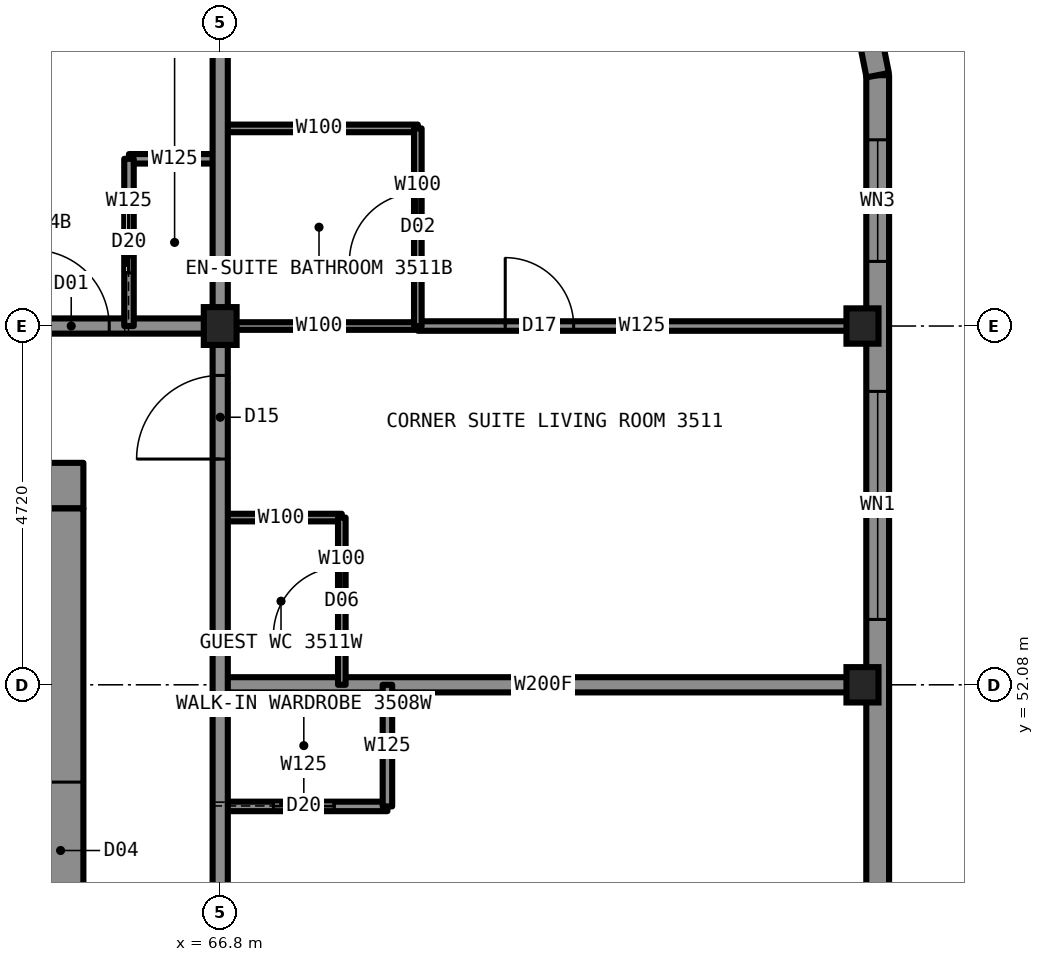
"""IFC4 building model, lengths in metres.
Left out: names, types, materials, properties, quantities, classifications, styles, units other than length and angle.
Written with IfcOpenShell. Run it as: python <this file> out.ifc"""

import sys

from ifc_helpers import new_model, si_unit, direction, frame, frame_2d, origin, origin_2d, place, context, subcontext, project, spatial, rectangle, i_section, extrude, element, fill, save


model = new_model("IFC4")
c1 = context("Model", 3, precision=1e-05, world=origin(), true_north=direction((0.0, 1.0)))
c2 = subcontext(c1, "Body", "Model", "MODEL_VIEW")
j1 = project(units=[si_unit("LENGTHUNIT", "METRE"), si_unit("PLANEANGLEUNIT", "RADIAN")], contexts=[c1])
p1 = place(None, origin())
s1 = spatial("IfcSite", under=j1, at=p1, CompositionType="ELEMENT")
p2 = place(p1, origin())
s2 = spatial("IfcBuilding", under=s1, at=p2, CompositionType="ELEMENT")
p3 = place(p2, frame((0.0, 0.0, 124.9)))
s3 = spatial("IfcBuildingStorey", under=s2, at=p3, CompositionType="ELEMENT", Elevation=124.9)
for number, where, z_axis, x_axis in (
    (1, (75.25, 52.08, 0.0), (0.0, 0.0, 1.0), (1.0, 0.0, 0.0)),
    (2, (75.25, 56.8, 0.0), (0.0, 0.0, 1.0), (1.0, 0.0, 0.0)),
):
    element("IfcColumn", number, at=place(p3, frame(where, z_axis=z_axis, x_axis=x_axis)), inside=s3, PredefinedType="COLUMN", context=c2, shape_type="SweptSolid", body=[
        extrude(i_section(OverallWidth=0.422, OverallDepth=0.465, WebThickness=0.045, FlangeThickness=0.073, at=origin_2d()), origin(), (0.0, 0.0, 1.0), 3.5),
    ])
p4 = place(p3, frame((66.8, 56.8, 0.0), z_axis=(0.0, 0.0, 1.0), x_axis=(1.0, 0.0, 0.0)))
e3 = element("IfcColumn", 3, at=p4, inside=s3, PredefinedType="COLUMN", context=c2, shape_type="SweptSolid", body=[
    extrude(i_section(OverallWidth=0.432, OverallDepth=0.498, WebThickness=0.056, FlangeThickness=0.089, at=origin_2d()), origin(), (0.0, 0.0, 1.0), 3.5),
])
p5 = place(p3, frame((45.0, 54.7, 0.0), z_axis=(0.0, 0.0, 1.0), x_axis=(1.0, 0.0, 0.0)))
e4 = element("IfcWall", 4, at=p5, inside=s3, PredefinedType="SHEAR", context=c2, shape_type="SweptSolid", body=[
    extrude(rectangle(XDim=20.0, YDim=0.6, at=frame_2d((10.0, 0.0))), origin(), (0.0, 0.0, 1.0), 3.5),
])
p6 = place(p3, frame((64.7, 35.6, 0.0), z_axis=(0.0, 0.0, 1.0), x_axis=(0.0, 1.0, 0.0)))
e5 = element("IfcWall", 5, at=p6, inside=s3, PredefinedType="SHEAR", context=c2, shape_type="SweptSolid", body=[
    extrude(rectangle(XDim=18.8, YDim=0.6, at=frame_2d((9.4, 0.0))), origin(), (0.0, 0.0, 1.0), 3.5),
])
p7 = place(p6, frame((13.4, 0.0, 0.0)))
e6 = element("IfcOpeningElement", 6, at=p7, cuts=e5, PredefinedType="OPENING", context=c2, shape_type="SweptSolid", body=[
    extrude(rectangle(XDim=1.8, YDim=2.2, at=frame_2d((0.9, 1.1))), frame((0.0, 0.31, 0.0), z_axis=(0.0, -1.0, 0.0), x_axis=(1.0, 0.0, 0.0)), (0.0, 0.0, 1.0), 0.62),
])
p8 = place(p6, frame((3.6, 0.0, 0.0)))
e7 = element("IfcOpeningElement", 7, at=p8, cuts=e5, PredefinedType="OPENING", context=c2, shape_type="SweptSolid", body=[
    extrude(rectangle(XDim=1.8, YDim=2.2, at=frame_2d((0.9, 1.1))), frame((0.0, 0.31, 0.0), z_axis=(0.0, -1.0, 0.0), x_axis=(1.0, 0.0, 0.0)), (0.0, 0.0, 1.0), 0.62),
])
p9 = place(p3, frame((66.8, 56.8, 0.0), z_axis=(0.0, 0.0, 1.0), x_axis=(1.0, 0.0, 0.0)))
e8 = element("IfcWall", 8, at=p9, inside=s3, PredefinedType="PARTITIONING", context=c2, shape_type="SweptSolid", body=[
    extrude(rectangle(XDim=2.6, YDim=0.1, at=frame_2d((1.3, 0.0))), origin(), (0.0, 0.0, 1.0), 2.573),
])
p10 = place(p3, frame((43.2, 56.8, 0.0), z_axis=(0.0, 0.0, 1.0), x_axis=(1.0, 0.0, 0.0)))
e9 = element("IfcWall", 9, at=p10, inside=s3, PredefinedType="PARTITIONING", context=c2, shape_type="SweptSolid", body=[
    extrude(rectangle(XDim=23.6, YDim=0.2, at=frame_2d((11.8, 0.0))), origin(), (0.0, 0.0, 1.0), 3.33),
])
p11 = place(p10, frame((0.7, 0.0, 0.0)))
e10 = element("IfcOpeningElement", 10, at=p11, cuts=e9, PredefinedType="OPENING", context=c2, shape_type="SweptSolid", body=[
    extrude(rectangle(XDim=1.0, YDim=2.2, at=frame_2d((0.5, 1.1))), frame((0.0, 0.11, 0.0), z_axis=(0.0, -1.0, 0.0), x_axis=(1.0, 0.0, 0.0)), (0.0, 0.0, 1.0), 0.22),
])
p12 = place(p10, frame((5.12, 0.0, 0.0)))
e11 = element("IfcOpeningElement", 11, at=p12, cuts=e9, PredefinedType="OPENING", context=c2, shape_type="SweptSolid", body=[
    extrude(rectangle(XDim=1.0, YDim=2.2, at=frame_2d((0.5, 1.1))), frame((0.0, 0.11, 0.0), z_axis=(0.0, -1.0, 0.0), x_axis=(1.0, 0.0, 0.0)), (0.0, 0.0, 1.0), 0.22),
])
p13 = place(p10, frame((12.44, 0.0, 0.0)))
e12 = element("IfcOpeningElement", 12, at=p13, cuts=e9, PredefinedType="OPENING", context=c2, shape_type="SweptSolid", body=[
    extrude(rectangle(XDim=1.0, YDim=2.2, at=frame_2d((0.5, 1.1))), frame((0.0, 0.11, 0.0), z_axis=(0.0, -1.0, 0.0), x_axis=(1.0, 0.0, 0.0)), (0.0, 0.0, 1.0), 0.22),
])
p14 = place(p10, frame((21.14, 0.0, 0.0)))
e13 = element("IfcOpeningElement", 13, at=p14, cuts=e9, PredefinedType="OPENING", context=c2, shape_type="SweptSolid", body=[
    extrude(rectangle(XDim=1.0, YDim=2.2, at=frame_2d((0.5, 1.1))), frame((0.0, 0.11, 0.0), z_axis=(0.0, -1.0, 0.0), x_axis=(1.0, 0.0, 0.0)), (0.0, 0.0, 1.0), 0.22),
])
p15 = place(p3, frame((69.4, 56.8, 0.0), z_axis=(0.0, 0.0, 1.0), x_axis=(1.0, 0.0, 0.0)))
e14 = element("IfcWall", 14, at=p15, inside=s3, PredefinedType="PARTITIONING", context=c2, shape_type="SweptSolid", body=[
    extrude(rectangle(XDim=5.9, YDim=0.125, at=frame_2d((2.95, 0.0))), origin(), (0.0, 0.0, 1.0), 2.573),
])
p16 = place(p15, frame((1.15, 0.0, 0.0)))
e15 = element("IfcOpeningElement", 15, at=p16, cuts=e14, PredefinedType="OPENING", context=c2, shape_type="SweptSolid", body=[
    extrude(rectangle(XDim=0.9, YDim=2.2, at=frame_2d((0.45, 1.1))), frame((0.0, 0.073, 0.0), z_axis=(0.0, -1.0, 0.0), x_axis=(1.0, 0.0, 0.0)), (0.0, 0.0, 1.0), 0.145),
])
p17 = place(p3, frame((65.6, 59.0, 0.0), z_axis=(0.0, 0.0, 1.0), x_axis=(1.0, 0.0, 0.0)))
e16 = element("IfcWall", 16, at=p17, inside=s3, PredefinedType="PARTITIONING", context=c2, shape_type="SweptSolid", body=[
    extrude(rectangle(XDim=1.2, YDim=0.125, at=frame_2d((0.6, 0.0))), origin(), (0.0, 0.0, 1.0), 3.33),
])
p18 = place(p3, frame((66.8, 59.4, 0.0), z_axis=(0.0, 0.0, 1.0), x_axis=(1.0, 0.0, 0.0)))
e17 = element("IfcWall", 17, at=p18, inside=s3, PredefinedType="PARTITIONING", context=c2, shape_type="SweptSolid", body=[
    extrude(rectangle(XDim=2.6, YDim=0.1, at=frame_2d((1.3, 0.0))), origin(), (0.0, 0.0, 1.0), 3.33),
])
p19 = place(p3, frame((66.8, 50.48, 0.0), z_axis=(0.0, 0.0, 1.0), x_axis=(1.0, 0.0, 0.0)))
e18 = element("IfcWall", 18, at=p19, inside=s3, PredefinedType="PARTITIONING", context=c2, shape_type="SweptSolid", body=[
    extrude(rectangle(XDim=2.2, YDim=0.125, at=frame_2d((1.1, 0.0))), origin(), (0.0, 0.0, 1.0), 3.33),
])
p20 = place(p19, frame((0.7, 0.0, 0.0)))
e19 = element("IfcOpeningElement", 19, at=p20, cuts=e18, PredefinedType="OPENING", context=c2, shape_type="SweptSolid", body=[
    extrude(rectangle(XDim=0.8, YDim=2.1, at=frame_2d((0.4, 1.05))), frame((0.0, 0.073, 0.0), z_axis=(0.0, -1.0, 0.0), x_axis=(1.0, 0.0, 0.0)), (0.0, 0.0, 1.0), 0.145),
])
p21 = place(p3, frame((66.8, 52.08, 0.0), z_axis=(0.0, 0.0, 1.0), x_axis=(1.0, 0.0, 0.0)))
e20 = element("IfcWall", 20, at=p21, inside=s3, PredefinedType="PARTITIONING", context=c2, shape_type="SweptSolid", body=[
    extrude(rectangle(XDim=8.5, YDim=0.2, at=frame_2d((4.25, 0.0))), origin(), (0.0, 0.0, 1.0), 2.573),
])
p22 = place(p3, frame((66.8, 54.28, 0.0), z_axis=(0.0, 0.0, 1.0), x_axis=(1.0, 0.0, 0.0)))
e21 = element("IfcWall", 21, at=p22, inside=s3, PredefinedType="PARTITIONING", context=c2, shape_type="SweptSolid", body=[
    extrude(rectangle(XDim=1.6, YDim=0.1, at=frame_2d((0.8, 0.0))), origin(), (0.0, 0.0, 1.0), 3.33),
])
p23 = place(p3, frame((65.6, 56.8, 0.0), z_axis=(0.0, 0.0, 1.0), x_axis=(0.0, 1.0, 0.0)))
e22 = element("IfcWall", 22, at=p23, inside=s3, PredefinedType="PARTITIONING", context=c2, shape_type="SweptSolid", body=[
    extrude(rectangle(XDim=2.2, YDim=0.125, at=frame_2d((1.1, 0.0))), origin(), (0.0, 0.0, 1.0), 3.33),
])
p24 = place(p23, frame((0.7, 0.0, 0.0)))
e23 = element("IfcOpeningElement", 23, at=p24, cuts=e22, PredefinedType="OPENING", context=c2, shape_type="SweptSolid", body=[
    extrude(rectangle(XDim=0.8, YDim=2.1, at=frame_2d((0.4, 1.05))), frame((0.0, 0.073, 0.0), z_axis=(0.0, -1.0, 0.0), x_axis=(1.0, 0.0, 0.0)), (0.0, 0.0, 1.0), 0.145),
])
p25 = place(p3, frame((66.8, 33.22, 0.0), z_axis=(0.0, 0.0, 1.0), x_axis=(0.0, 1.0, 0.0)))
e24 = element("IfcWall", 24, at=p25, inside=s3, PredefinedType="PARTITIONING", context=c2, shape_type="SweptSolid", body=[
    extrude(rectangle(XDim=23.58, YDim=0.2, at=frame_2d((11.79, 0.0))), origin(), (0.0, 0.0, 1.0), 3.33),
])
p26 = place(p25, frame((7.85, 0.0, 0.0)))
e25 = element("IfcOpeningElement", 25, at=p26, cuts=e24, PredefinedType="OPENING", context=c2, shape_type="SweptSolid", body=[
    extrude(rectangle(XDim=1.0, YDim=2.2, at=frame_2d((0.5, 1.1))), frame((0.0, 0.11, 0.0), z_axis=(0.0, -1.0, 0.0), x_axis=(1.0, 0.0, 0.0)), (0.0, 0.0, 1.0), 0.22),
])
p27 = place(p25, frame((12.42, 0.0, 0.0)))
e26 = element("IfcOpeningElement", 26, at=p27, cuts=e24, PredefinedType="OPENING", context=c2, shape_type="SweptSolid", body=[
    extrude(rectangle(XDim=1.0, YDim=2.2, at=frame_2d((0.5, 1.1))), frame((0.0, 0.11, 0.0), z_axis=(0.0, -1.0, 0.0), x_axis=(1.0, 0.0, 0.0)), (0.0, 0.0, 1.0), 0.22),
])
p28 = place(p25, frame((21.83, 0.0, 0.0)))
e27 = element("IfcOpeningElement", 27, at=p28, cuts=e24, PredefinedType="OPENING", context=c2, shape_type="SweptSolid", body=[
    extrude(rectangle(XDim=1.1, YDim=2.2, at=frame_2d((0.55, 1.1))), frame((0.0, 0.11, 0.0), z_axis=(0.0, -1.0, 0.0), x_axis=(1.0, 0.0, 0.0)), (0.0, 0.0, 1.0), 0.22),
])
p29 = place(p25, frame((0.63, 0.0, 0.0)))
e28 = element("IfcOpeningElement", 28, at=p29, cuts=e24, PredefinedType="OPENING", context=c2, shape_type="SweptSolid", body=[
    extrude(rectangle(XDim=1.1, YDim=2.2, at=frame_2d((0.55, 1.1))), frame((0.0, 0.11, 0.0), z_axis=(0.0, -1.0, 0.0), x_axis=(1.0, 0.0, 0.0)), (0.0, 0.0, 1.0), 0.22),
])
p30 = place(p3, frame((66.8, 56.8, 0.0), z_axis=(0.0, 0.0, 1.0), x_axis=(0.0, 1.0, 0.0)))
e29 = element("IfcWall", 29, at=p30, inside=s3, PredefinedType="PARTITIONING", context=c2, shape_type="SweptSolid", body=[
    extrude(rectangle(XDim=8.5, YDim=0.2, at=frame_2d((4.25, 0.0))), origin(), (0.0, 0.0, 1.0), 2.573),
])
p31 = place(p3, frame((68.4, 52.08, 0.0), z_axis=(0.0, 0.0, 1.0), x_axis=(0.0, 1.0, 0.0)))
e30 = element("IfcWall", 30, at=p31, inside=s3, PredefinedType="PARTITIONING", context=c2, shape_type="SweptSolid", body=[
    extrude(rectangle(XDim=2.2, YDim=0.1, at=frame_2d((1.1, 0.0))), origin(), (0.0, 0.0, 1.0), 3.33),
])
p32 = place(p31, frame((0.65, 0.0, 0.0)))
e31 = element("IfcOpeningElement", 31, at=p32, cuts=e30, PredefinedType="OPENING", context=c2, shape_type="SweptSolid", body=[
    extrude(rectangle(XDim=0.9, YDim=2.1, at=frame_2d((0.45, 1.05))), frame((0.0, 0.06, 0.0), z_axis=(0.0, -1.0, 0.0), x_axis=(1.0, 0.0, 0.0)), (0.0, 0.0, 1.0), 0.12),
])
p33 = place(p3, frame((69.0, 50.48, 0.0), z_axis=(0.0, 0.0, 1.0), x_axis=(0.0, 1.0, 0.0)))
e32 = element("IfcWall", 32, at=p33, inside=s3, PredefinedType="PARTITIONING", context=c2, shape_type="SweptSolid", body=[
    extrude(rectangle(XDim=1.6, YDim=0.125, at=frame_2d((0.8, 0.0))), origin(), (0.0, 0.0, 1.0), 3.33),
])
p34 = place(p3, frame((69.4, 56.8, 0.0), z_axis=(0.0, 0.0, 1.0), x_axis=(0.0, 1.0, 0.0)))
e33 = element("IfcWall", 33, at=p34, inside=s3, PredefinedType="PARTITIONING", context=c2, shape_type="SweptSolid", body=[
    extrude(rectangle(XDim=2.6, YDim=0.1, at=frame_2d((1.3, 0.0))), origin(), (0.0, 0.0, 1.0), 3.33),
])
p35 = place(p34, frame((0.85, 0.0, 0.0)))
e34 = element("IfcOpeningElement", 34, at=p35, cuts=e33, PredefinedType="OPENING", context=c2, shape_type="SweptSolid", body=[
    extrude(rectangle(XDim=0.9, YDim=2.1, at=frame_2d((0.45, 1.05))), frame((0.0, 0.06, 0.0), z_axis=(0.0, -1.0, 0.0), x_axis=(1.0, 0.0, 0.0)), (0.0, 0.0, 1.0), 0.12),
])
p36 = place(p3, frame((75.45, 29.9, 0.0), z_axis=(0.0, 0.0, 1.0), x_axis=(0.0, 1.0, 0.0)))
e35 = element("IfcWall", 35, at=p36, inside=s3, PredefinedType="SOLIDWALL", context=c2, shape_type="SweptSolid", body=[
    extrude(rectangle(XDim=30.2, YDim=0.3, at=frame_2d((15.1, 0.0))), origin(), (0.0, 0.0, 1.0), 2.83),
])
p37 = place(p36, frame((0.85, 0.0, 0.5)))
e36 = element("IfcOpeningElement", 36, at=p37, cuts=e35, PredefinedType="OPENING", context=c2, shape_type="SweptSolid", body=[
    extrude(rectangle(XDim=1.6, YDim=2.0, at=frame_2d((0.8, 1.0))), frame((0.0, 0.16, 0.0), z_axis=(0.0, -1.0, 0.0), x_axis=(1.0, 0.0, 0.0)), (0.0, 0.0, 1.0), 0.32),
])
p38 = place(p36, frame((4.16, 0.0, 0.5)))
e37 = element("IfcOpeningElement", 37, at=p38, cuts=e35, PredefinedType="OPENING", context=c2, shape_type="SweptSolid", body=[
    extrude(rectangle(XDim=3.0, YDim=2.0, at=frame_2d((1.5, 1.0))), frame((0.0, 0.16, 0.0), z_axis=(0.0, -1.0, 0.0), x_axis=(1.0, 0.0, 0.0)), (0.0, 0.0, 1.0), 0.32),
])
p39 = place(p36, frame((8.88, 0.0, 0.5)))
e38 = element("IfcOpeningElement", 38, at=p39, cuts=e35, PredefinedType="OPENING", context=c2, shape_type="SweptSolid", body=[
    extrude(rectangle(XDim=3.0, YDim=2.0, at=frame_2d((1.5, 1.0))), frame((0.0, 0.16, 0.0), z_axis=(0.0, -1.0, 0.0), x_axis=(1.0, 0.0, 0.0)), (0.0, 0.0, 1.0), 0.32),
])
p40 = place(p36, frame((18.32, 0.0, 0.5)))
e39 = element("IfcOpeningElement", 39, at=p40, cuts=e35, PredefinedType="OPENING", context=c2, shape_type="SweptSolid", body=[
    extrude(rectangle(XDim=3.0, YDim=2.0, at=frame_2d((1.5, 1.0))), frame((0.0, 0.16, 0.0), z_axis=(0.0, -1.0, 0.0), x_axis=(1.0, 0.0, 0.0)), (0.0, 0.0, 1.0), 0.32),
])
p41 = place(p36, frame((23.04, 0.0, 0.5)))
e40 = element("IfcOpeningElement", 40, at=p41, cuts=e35, PredefinedType="OPENING", context=c2, shape_type="SweptSolid", body=[
    extrude(rectangle(XDim=3.0, YDim=2.0, at=frame_2d((1.5, 1.0))), frame((0.0, 0.16, 0.0), z_axis=(0.0, -1.0, 0.0), x_axis=(1.0, 0.0, 0.0)), (0.0, 0.0, 1.0), 0.32),
])
p42 = place(p36, frame((27.75, 0.0, 0.5)))
e41 = element("IfcOpeningElement", 41, at=p42, cuts=e35, PredefinedType="OPENING", context=c2, shape_type="SweptSolid", body=[
    extrude(rectangle(XDim=1.6, YDim=2.0, at=frame_2d((0.8, 1.0))), frame((0.0, 0.16, 0.0), z_axis=(0.0, -1.0, 0.0), x_axis=(1.0, 0.0, 0.0)), (0.0, 0.0, 1.0), 0.32),
])
p43 = place(p3, frame((75.45, 60.1, 0.0), z_axis=(0.0, 0.0, 1.0), x_axis=(-0.195081421501, 0.980787050784, 0.0)))
e42 = element("IfcWall", 42, at=p43, inside=s3, PredefinedType="SOLIDWALL", context=c2, shape_type="SweptSolid", body=[
    extrude(rectangle(XDim=2.087, YDim=0.3, at=frame_2d((1.044, 0.0))), origin(), (0.0, 0.0, 1.0), 3.33),
])
p44 = place(p43, frame((0.444, 0.0, 0.5)))
e43 = element("IfcOpeningElement", 43, at=p44, cuts=e42, PredefinedType="OPENING", context=c2, shape_type="SweptSolid", body=[
    extrude(rectangle(XDim=1.2, YDim=2.0, at=frame_2d((0.6, 1.0))), frame((0.0, 0.16, 0.0), z_axis=(0.0, -1.0, 0.0), x_axis=(1.0, 0.0, 0.0)), (0.0, 0.0, 1.0), 0.32),
])
p45 = place(p14, origin())
e44 = element("IfcDoor", 44, at=p45, inside=s3, OperationType="SINGLE_SWING_LEFT", PredefinedType="DOOR", context=c2, shape_type="SweptSolid", body=[
    extrude(rectangle(XDim=1.0, YDim=2.2, at=frame_2d((0.5, 1.1))), frame((0.0, 0.025, 0.0), z_axis=(0.0, -1.0, 0.0), x_axis=(1.0, 0.0, 0.0)), (0.0, 0.0, 1.0), 0.05),
])
fill(e13, e44)
p46 = place(p24, origin())
e45 = element("IfcDoor", 45, at=p46, inside=s3, OperationType="SLIDING_TO_LEFT", PredefinedType="DOOR", context=c2, shape_type="SweptSolid", body=[
    extrude(rectangle(XDim=0.8, YDim=2.1, at=frame_2d((0.4, 1.05))), frame((0.0, 0.025, 0.0), z_axis=(0.0, -1.0, 0.0), x_axis=(1.0, 0.0, 0.0)), (0.0, 0.0, 1.0), 0.05),
])
fill(e23, e45)
p47 = place(p20, origin())
e46 = element("IfcDoor", 46, at=p47, inside=s3, OperationType="SLIDING_TO_LEFT", PredefinedType="DOOR", context=c2, shape_type="SweptSolid", body=[
    extrude(rectangle(XDim=0.8, YDim=2.1, at=frame_2d((0.4, 1.05))), frame((0.0, 0.025, 0.0), z_axis=(0.0, -1.0, 0.0), x_axis=(1.0, 0.0, 0.0)), (0.0, 0.0, 1.0), 0.05),
])
fill(e19, e46)
p48 = place(p28, origin())
e47 = element("IfcDoor", 47, at=p48, inside=s3, OperationType="SINGLE_SWING_LEFT", PredefinedType="DOOR", context=c2, shape_type="SweptSolid", body=[
    extrude(rectangle(XDim=1.1, YDim=2.2, at=frame_2d((0.55, 1.1))), frame((0.0, 0.025, 0.0), z_axis=(0.0, -1.0, 0.0), x_axis=(1.0, 0.0, 0.0)), (0.0, 0.0, 1.0), 0.05),
])
fill(e27, e47)
p49 = place(p35, origin())
e48 = element("IfcDoor", 48, at=p49, inside=s3, OperationType="SINGLE_SWING_RIGHT", PredefinedType="DOOR", context=c2, shape_type="SweptSolid", body=[
    extrude(rectangle(XDim=0.9, YDim=2.1, at=frame_2d((0.45, 1.05))), frame((0.0, 0.025, 0.0), z_axis=(0.0, -1.0, 0.0), x_axis=(1.0, 0.0, 0.0)), (0.0, 0.0, 1.0), 0.05),
])
fill(e34, e48)
p50 = place(p16, origin())
e49 = element("IfcDoor", 49, at=p50, inside=s3, OperationType="SINGLE_SWING_LEFT", PredefinedType="DOOR", context=c2, shape_type="SweptSolid", body=[
    extrude(rectangle(XDim=0.9, YDim=2.2, at=frame_2d((0.45, 1.1))), frame((0.0, 0.025, 0.0), z_axis=(0.0, -1.0, 0.0), x_axis=(1.0, 0.0, 0.0)), (0.0, 0.0, 1.0), 0.05),
])
fill(e15, e49)
p51 = place(p32, origin())
e50 = element("IfcDoor", 50, at=p51, inside=s3, OperationType="SINGLE_SWING_LEFT", PredefinedType="DOOR", context=c2, shape_type="SweptSolid", body=[
    extrude(rectangle(XDim=0.9, YDim=2.1, at=frame_2d((0.45, 1.05))), frame((0.0, 0.025, 0.0), z_axis=(0.0, -1.0, 0.0), x_axis=(1.0, 0.0, 0.0)), (0.0, 0.0, 1.0), 0.05),
])
fill(e31, e50)
p52 = place(p40, origin())
e51 = element("IfcWindow", 51, at=p52, inside=s3, PartitioningType="SINGLE_PANEL", PredefinedType="WINDOW", context=c2, shape_type="SweptSolid", body=[
    extrude(rectangle(XDim=3.0, YDim=2.0, at=frame_2d((1.5, 1.0))), frame((0.0, 0.03, 0.0), z_axis=(0.0, -1.0, 0.0), x_axis=(1.0, 0.0, 0.0)), (0.0, 0.0, 1.0), 0.06),
])
fill(e39, e51)
p53 = place(p41, origin())
e52 = element("IfcWindow", 52, at=p53, inside=s3, PartitioningType="SINGLE_PANEL", PredefinedType="WINDOW", context=c2, shape_type="SweptSolid", body=[
    extrude(rectangle(XDim=3.0, YDim=2.0, at=frame_2d((1.5, 1.0))), frame((0.0, 0.03, 0.0), z_axis=(0.0, -1.0, 0.0), x_axis=(1.0, 0.0, 0.0)), (0.0, 0.0, 1.0), 0.06),
])
fill(e40, e52)
p54 = place(p42, origin())
e53 = element("IfcWindow", 53, at=p54, inside=s3, PartitioningType="SINGLE_PANEL", PredefinedType="WINDOW", context=c2, shape_type="SweptSolid", body=[
    extrude(rectangle(XDim=1.6, YDim=2.0, at=frame_2d((0.8, 1.0))), frame((0.0, 0.03, 0.0), z_axis=(0.0, -1.0, 0.0), x_axis=(1.0, 0.0, 0.0)), (0.0, 0.0, 1.0), 0.06),
])
fill(e41, e53)
p55 = place(p7, origin())
e54 = element("IfcDoor", 54, at=p55, inside=s3, OperationType="DOUBLE_DOOR_SINGLE_SWING", PredefinedType="DOOR", context=c2, shape_type="SweptSolid", body=[
    extrude(rectangle(XDim=1.8, YDim=2.2, at=frame_2d((0.9, 1.1))), frame((0.0, 0.025, 0.0), z_axis=(0.0, -1.0, 0.0), x_axis=(1.0, 0.0, 0.0)), (0.0, 0.0, 1.0), 0.05),
])
fill(e6, e54)
save(model, sys.argv[1])
